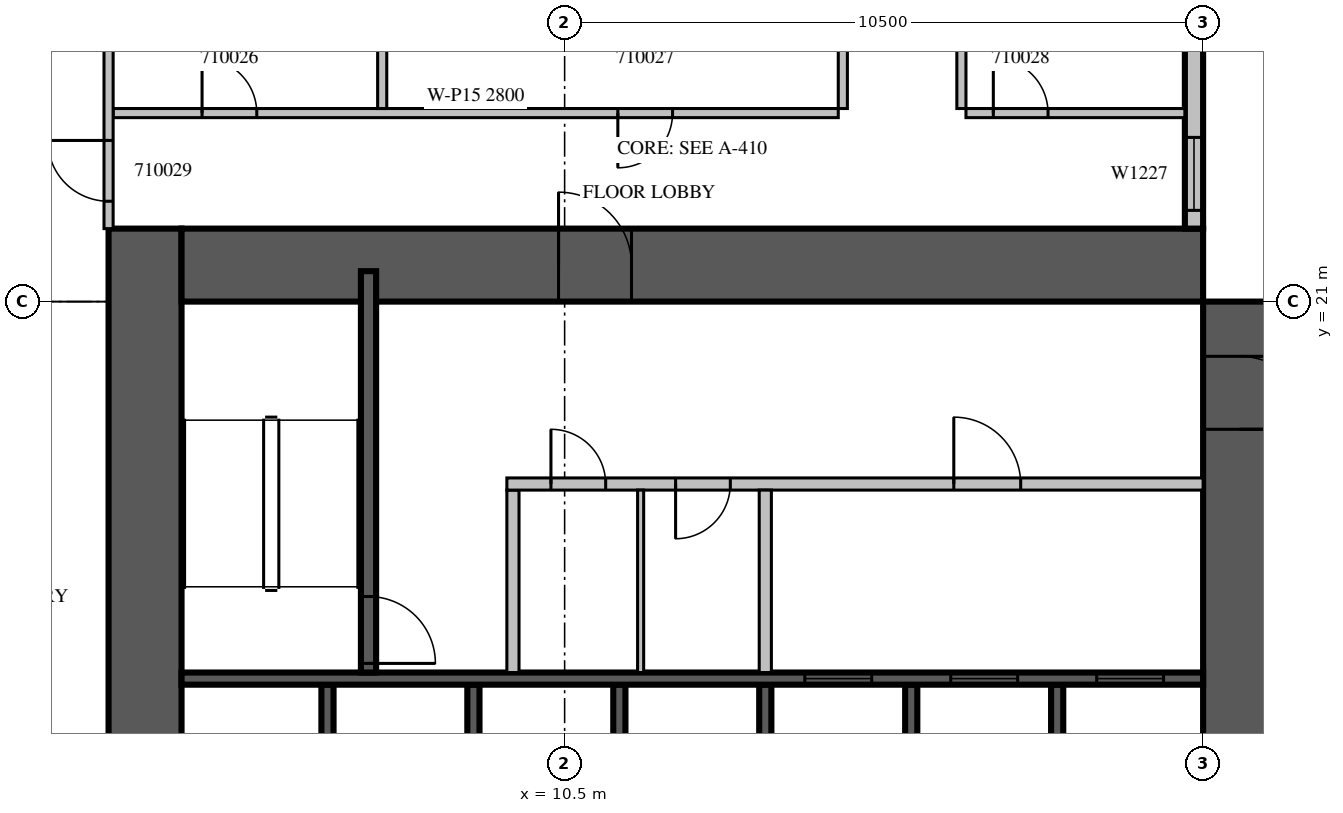
"""IFC4 building model, lengths in metres.
Left out: names, types, materials, properties, quantities, classifications, styles, units other than length and angle.
Written with IfcOpenShell. Run it as: python <this file> out.ifc"""

import sys

from ifc_helpers import new_model, si_unit, direction, frame, frame_2d, origin, place, context, subcontext, project, spatial, rectangle, extrude, source, transform, mapped, element, fill, save


model = new_model("IFC4")
c1 = context("Model", 3, precision=1e-05, world=origin(), true_north=direction((0.0, 1.0)))
c2 = subcontext(c1, "Body", "Model", "MODEL_VIEW")
j1 = project(units=[si_unit("LENGTHUNIT", "METRE"), si_unit("PLANEANGLEUNIT", "RADIAN")], contexts=[c1])
p1 = place(None, origin())
s1 = spatial("IfcSite", under=j1, at=p1, CompositionType="ELEMENT")
p2 = place(p1, origin())
s2 = spatial("IfcBuilding", under=s1, at=p2, CompositionType="ELEMENT")
p3 = place(p2, frame((0.0, 0.0, 53.1)))
s3 = spatial("IfcBuildingStorey", under=s2, at=p3, CompositionType="ELEMENT", Elevation=53.1)
m1 = source(origin(), c2, "Body", "SweptSolid", [
    extrude(rectangle(XDim=18.0, YDim=1.2, at=frame_2d((9.0, 0.0))), origin(), (0.0, 0.0, 1.0), 4.2),
])
p4 = place(p3, frame((3.6, 4.2, 0.0), z_axis=(0.0, 0.0, 1.0), x_axis=(0.0, 1.0, 0.0)))
e1 = element("IfcWall", 1, at=p4, inside=s3, PredefinedType="SHEAR", context=c2, shape_type="MappedRepresentation", body=[
    mapped(m1, transform((0.0, 0.0, 0.0), scale=1.0)),
])
m2 = source(origin(), c2, "Body", "SweptSolid", [
    extrude(rectangle(XDim=2.2, YDim=2.1, at=frame_2d((1.1, 1.05))), frame((0.0, 0.61, 0.0), z_axis=(0.0, -1.0, 0.0), x_axis=(1.0, 0.0, 0.0)), (0.0, 0.0, 1.0), 1.22),
])
p5 = place(p4, frame((4.2, 0.0, 0.0)))
e2 = element("IfcOpeningElement", 2, at=p5, cuts=e1, PredefinedType="OPENING", context=c2, shape_type="MappedRepresentation", body=[
    mapped(m2, transform((0.0, 0.0, 0.0), scale=1.0)),
])
m3 = source(origin(), c2, "Body", "SweptSolid", [
    extrude(rectangle(XDim=16.8, YDim=1.2, at=frame_2d((8.4, 0.0))), origin(), (0.0, 0.0, 1.0), 4.2),
])
p6 = place(p3, frame((21.6, 4.2, 0.0), z_axis=(0.0, 0.0, 1.0), x_axis=(0.0, 1.0, 0.0)))
e3 = element("IfcWall", 3, at=p6, inside=s3, PredefinedType="SHEAR", context=c2, shape_type="MappedRepresentation", body=[
    mapped(m3, transform((0.0, 0.0, 0.0), scale=1.0)),
])
m4 = source(origin(), c2, "Body", "SweptSolid", [
    extrude(rectangle(XDim=1.2, YDim=2.1, at=frame_2d((0.6, 1.05))), frame((0.0, 0.61, 0.0), z_axis=(0.0, -1.0, 0.0), x_axis=(1.0, 0.0, 0.0)), (0.0, 0.0, 1.0), 1.22),
])
p7 = place(p6, frame((14.7, 0.0, 0.0)))
e4 = element("IfcOpeningElement", 4, at=p7, cuts=e3, PredefinedType="OPENING", context=c2, shape_type="MappedRepresentation", body=[
    mapped(m4, transform((0.0, 0.0, 0.0), scale=1.0)),
])
p8 = place(p3, frame((4.2, 21.6, 0.0), z_axis=(0.0, 0.0, 1.0), x_axis=(1.0, 0.0, 0.0)))
e5 = element("IfcWall", 5, at=p8, inside=s3, PredefinedType="SHEAR", context=c2, shape_type="MappedRepresentation", body=[
    mapped(m3, transform((0.0, 0.0, 0.0), scale=1.0)),
])
p9 = place(p8, frame((6.2, 0.0, 0.0)))
e6 = element("IfcOpeningElement", 6, at=p9, cuts=e5, PredefinedType="OPENING", context=c2, shape_type="MappedRepresentation", body=[
    mapped(m4, transform((0.0, 0.0, 0.0), scale=1.0)),
])
m5 = source(origin(), c2, "Body", "SweptSolid", [
    extrude(rectangle(XDim=6.6, YDim=0.3, at=frame_2d((3.3, 0.0))), origin(), (0.0, 0.0, 1.0), 3.8),
])
p10 = place(p3, frame((20.85, 22.2, 0.0), z_axis=(0.0, 0.0, 1.0), x_axis=(0.0, 1.0, 0.0)))
e7 = element("IfcWall", 7, at=p10, inside=s3, PredefinedType="STANDARD", context=c2, shape_type="MappedRepresentation", body=[
    mapped(m5, transform((0.0, 0.0, 0.0), scale=1.0)),
])
m6 = source(origin(), c2, "Body", "SweptSolid", [
    extrude(rectangle(XDim=1.2, YDim=2.7, at=frame_2d((0.6, 1.35))), frame((0.0, 0.16, 0.0), z_axis=(0.0, -1.0, 0.0), x_axis=(1.0, 0.0, 0.0)), (0.0, 0.0, 1.0), 0.32),
])
p11 = place(p10, frame((0.3, 0.0, 0.6)))
e8 = element("IfcOpeningElement", 8, at=p11, cuts=e7, PredefinedType="OPENING", context=c2, shape_type="MappedRepresentation", body=[
    mapped(m6, transform((0.0, 0.0, 0.0), scale=1.0)),
])
m7 = source(origin(), c2, "Body", "SweptSolid", [
    extrude(rectangle(XDim=2.4, YDim=2.7, at=frame_2d((1.2, 1.35))), frame((0.0, 0.16, 0.0), z_axis=(0.0, -1.0, 0.0), x_axis=(1.0, 0.0, 0.0)), (0.0, 0.0, 1.0), 0.32),
])
p12 = place(p10, frame((3.9, 0.0, 0.6)))
e9 = element("IfcOpeningElement", 9, at=p12, cuts=e7, PredefinedType="OPENING", context=c2, shape_type="MappedRepresentation", body=[
    mapped(m7, transform((0.0, 0.0, 0.0), scale=1.0)),
])
m8 = source(origin(), c2, "Body", "SweptSolid", [
    extrude(rectangle(XDim=3.0, YDim=0.2, at=frame_2d((1.5, 0.0))), origin(), (0.0, 0.0, 1.0), 4.2),
])
for number, where, z_axis, x_axis in (
    (10, (6.6, 11.7, 0.0), (0.0, 0.0, 1.0), (0.0, 1.0, 0.0)),
    (11, (9.0, 11.7, 0.0), (0.0, 0.0, 1.0), (0.0, 1.0, 0.0)),
    (12, (11.4, 11.7, 0.0), (0.0, 0.0, 1.0), (0.0, 1.0, 0.0)),
    (13, (13.8, 11.7, 0.0), (0.0, 0.0, 1.0), (0.0, 1.0, 0.0)),
    (14, (16.2, 11.7, 0.0), (0.0, 0.0, 1.0), (0.0, 1.0, 0.0)),
    (15, (18.6, 11.7, 0.0), (0.0, 0.0, 1.0), (0.0, 1.0, 0.0)),
):
    element("IfcWall", number, at=place(p3, frame(where, z_axis=z_axis, x_axis=x_axis)), inside=s3, PredefinedType="SOLIDWALL", context=c2, shape_type="MappedRepresentation", body=[
        mapped(m8, transform((0.0, 0.0, 0.0), scale=1.0)),
    ])
m9 = source(origin(), c2, "Body", "SweptSolid", [
    extrude(rectangle(XDim=16.8, YDim=0.2, at=frame_2d((8.4, 0.0))), origin(), (0.0, 0.0, 1.0), 4.2),
])
p13 = place(p3, frame((4.2, 14.8, 0.0), z_axis=(0.0, 0.0, 1.0), x_axis=(1.0, 0.0, 0.0)))
e16 = element("IfcWall", 16, at=p13, inside=s3, PredefinedType="SOLIDWALL", context=c2, shape_type="MappedRepresentation", body=[
    mapped(m9, transform((0.0, 0.0, 0.0), scale=1.0)),
])
m10 = source(origin(), c2, "Body", "SweptSolid", [
    extrude(rectangle(XDim=1.1, YDim=2.1, at=frame_2d((0.55, 1.05))), frame((0.0, 0.11, 0.0), z_axis=(0.0, -1.0, 0.0), x_axis=(1.0, 0.0, 0.0)), (0.0, 0.0, 1.0), 0.22),
])
p14 = place(p13, frame((10.25, 0.0, 0.0)))
e17 = element("IfcOpeningElement", 17, at=p14, cuts=e16, PredefinedType="OPENING", context=c2, shape_type="MappedRepresentation", body=[
    mapped(m10, transform((0.0, 0.0, 0.0), scale=1.0)),
])
p15 = place(p13, frame((12.65, 0.0, 0.0)))
e18 = element("IfcOpeningElement", 18, at=p15, cuts=e16, PredefinedType="OPENING", context=c2, shape_type="MappedRepresentation", body=[
    mapped(m10, transform((0.0, 0.0, 0.0), scale=1.0)),
])
p16 = place(p13, frame((15.05, 0.0, 0.0)))
e19 = element("IfcOpeningElement", 19, at=p16, cuts=e16, PredefinedType="OPENING", context=c2, shape_type="MappedRepresentation", body=[
    mapped(m10, transform((0.0, 0.0, 0.0), scale=1.0)),
])
m11 = source(origin(), c2, "Body", "SweptSolid", [
    extrude(rectangle(XDim=6.6, YDim=0.25, at=frame_2d((3.3, 0.0))), origin(), (0.0, 0.0, 1.0), 3.8),
])
p17 = place(p3, frame((7.275, 14.9, 0.0), z_axis=(0.0, 0.0, 1.0), x_axis=(0.0, 1.0, 0.0)))
e20 = element("IfcWall", 20, at=p17, inside=s3, PredefinedType="SOLIDWALL", context=c2, shape_type="MappedRepresentation", body=[
    mapped(m11, transform((0.0, 0.0, 0.0), scale=1.0)),
])
m12 = source(origin(), c2, "Body", "SweptSolid", [
    extrude(rectangle(XDim=1.1, YDim=2.1, at=frame_2d((0.55, 1.05))), frame((0.0, 0.135, 0.0), z_axis=(0.0, -1.0, 0.0), x_axis=(1.0, 0.0, 0.0)), (0.0, 0.0, 1.0), 0.27),
])
p18 = place(p17, frame((0.15, 0.0, 0.0)))
e21 = element("IfcOpeningElement", 21, at=p18, cuts=e20, PredefinedType="OPENING", context=c2, shape_type="MappedRepresentation", body=[
    mapped(m12, transform((0.0, 0.0, 0.0), scale=1.0)),
])
m13 = source(origin(), c2, "Body", "SweptSolid", [
    extrude(rectangle(XDim=3.0, YDim=0.2, at=frame_2d((1.5, 0.0))), origin(), (0.0, 0.0, 1.0), 3.8),
])
p19 = place(p3, frame((9.65, 14.9, 0.0), z_axis=(0.0, 0.0, 1.0), x_axis=(0.0, 1.0, 0.0)))
e22 = element("IfcWall", 22, at=p19, inside=s3, PredefinedType="PARTITIONING", context=c2, shape_type="MappedRepresentation", body=[
    mapped(m13, transform((0.0, 0.0, 0.0), scale=1.0)),
])
m14 = source(origin(), c2, "Body", "SweptSolid", [
    extrude(rectangle(XDim=11.45, YDim=0.2, at=frame_2d((5.725, 0.0))), origin(), (0.0, 0.0, 1.0), 3.8),
])
p20 = place(p3, frame((9.55, 18.0, 0.0), z_axis=(0.0, 0.0, 1.0), x_axis=(1.0, 0.0, 0.0)))
e23 = element("IfcWall", 23, at=p20, inside=s3, PredefinedType="PARTITIONING", context=c2, shape_type="MappedRepresentation", body=[
    mapped(m14, transform((0.0, 0.0, 0.0), scale=1.0)),
])
m15 = source(origin(), c2, "Body", "SweptSolid", [
    extrude(rectangle(XDim=0.9, YDim=2.1, at=frame_2d((0.45, 1.05))), frame((0.0, 0.11, 0.0), z_axis=(0.0, -1.0, 0.0), x_axis=(1.0, 0.0, 0.0)), (0.0, 0.0, 1.0), 0.22),
])
p21 = place(p20, frame((0.725, 0.0, 0.0)))
e24 = element("IfcOpeningElement", 24, at=p21, cuts=e23, PredefinedType="OPENING", context=c2, shape_type="MappedRepresentation", body=[
    mapped(m15, transform((0.0, 0.0, 0.0), scale=1.0)),
])
p22 = place(p20, frame((2.775, 0.0, 0.0)))
e25 = element("IfcOpeningElement", 25, at=p22, cuts=e23, PredefinedType="OPENING", context=c2, shape_type="MappedRepresentation", body=[
    mapped(m15, transform((0.0, 0.0, 0.0), scale=1.0)),
])
p23 = place(p20, frame((7.35, 0.0, 0.0)))
e26 = element("IfcOpeningElement", 26, at=p23, cuts=e23, PredefinedType="OPENING", context=c2, shape_type="MappedRepresentation", body=[
    mapped(m10, transform((0.0, 0.0, 0.0), scale=1.0)),
])
p24 = place(p3, frame((13.8, 14.9, 0.0), z_axis=(0.0, 0.0, 1.0), x_axis=(0.0, 1.0, 0.0)))
e27 = element("IfcWall", 27, at=p24, inside=s3, PredefinedType="PARTITIONING", context=c2, shape_type="MappedRepresentation", body=[
    mapped(m13, transform((0.0, 0.0, 0.0), scale=1.0)),
])
m16 = source(origin(), c2, "Body", "SweptSolid", [
    extrude(rectangle(XDim=3.0, YDim=0.1, at=frame_2d((1.5, 0.0))), origin(), (0.0, 0.0, 1.0), 3.8),
])
p25 = place(p3, frame((11.75, 14.9, 0.0), z_axis=(0.0, 0.0, 1.0), x_axis=(0.0, 1.0, 0.0)))
e28 = element("IfcWall", 28, at=p25, inside=s3, PredefinedType="PARTITIONING", context=c2, shape_type="MappedRepresentation", body=[
    mapped(m16, transform((0.0, 0.0, 0.0), scale=1.0)),
])
m17 = source(origin(), c2, "Body", "SweptSolid", [
    extrude(rectangle(XDim=11.925, YDim=0.15, at=frame_2d((5.963, 0.0))), origin(), (0.0, 0.0, 1.0), 2.8),
])
p26 = place(p3, frame((3.075, 24.1, 0.0), z_axis=(0.0, 0.0, 1.0), x_axis=(1.0, 0.0, 0.0)))
e29 = element("IfcWall", 29, at=p26, inside=s3, PredefinedType="PARTITIONING", context=c2, shape_type="MappedRepresentation", body=[
    mapped(m17, transform((0.0, 0.0, 0.0), scale=1.0)),
])
m18 = source(origin(), c2, "Body", "SweptSolid", [
    extrude(rectangle(XDim=0.9, YDim=2.1, at=frame_2d((0.45, 1.05))), frame((0.0, 0.085, 0.0), z_axis=(0.0, -1.0, 0.0), x_axis=(1.0, 0.0, 0.0)), (0.0, 0.0, 1.0), 0.17),
])
p27 = place(p26, frame((1.462, 0.0, 0.0)))
e30 = element("IfcOpeningElement", 30, at=p27, cuts=e29, PredefinedType="OPENING", context=c2, shape_type="MappedRepresentation", body=[
    mapped(m18, transform((0.0, 0.0, 0.0), scale=1.0)),
])
p28 = place(p26, frame((8.3, 0.0, 0.0)))
e31 = element("IfcOpeningElement", 31, at=p28, cuts=e29, PredefinedType="OPENING", context=c2, shape_type="MappedRepresentation", body=[
    mapped(m18, transform((0.0, 0.0, 0.0), scale=1.0)),
])
m19 = source(origin(), c2, "Body", "SweptSolid", [
    extrude(rectangle(XDim=3.6, YDim=0.15, at=frame_2d((1.8, 0.0))), origin(), (0.0, 0.0, 1.0), 3.8),
])
p29 = place(p3, frame((17.1, 24.1, 0.0), z_axis=(0.0, 0.0, 1.0), x_axis=(1.0, 0.0, 0.0)))
e32 = element("IfcWall", 32, at=p29, inside=s3, PredefinedType="PARTITIONING", context=c2, shape_type="MappedRepresentation", body=[
    mapped(m19, transform((0.0, 0.0, 0.0), scale=1.0)),
])
p30 = place(p29, frame((0.45, 0.0, 0.0)))
e33 = element("IfcOpeningElement", 33, at=p30, cuts=e32, PredefinedType="OPENING", context=c2, shape_type="MappedRepresentation", body=[
    mapped(m18, transform((0.0, 0.0, 0.0), scale=1.0)),
])
m20 = source(origin(), c2, "Body", "SweptSolid", [
    extrude(rectangle(XDim=5.15, YDim=0.15, at=frame_2d((2.575, 0.0))), origin(), (0.0, 0.0, 1.0), 3.3),
])
p31 = place(p3, frame((7.5, 24.175, 0.0), z_axis=(0.0, 0.0, 1.0), x_axis=(0.0, 1.0, 0.0)))
e34 = element("IfcWall", 34, at=p31, inside=s3, PredefinedType="PARTITIONING", context=c2, shape_type="MappedRepresentation", body=[
    mapped(m20, transform((0.0, 0.0, 0.0), scale=1.0)),
])
m21 = source(origin(), c2, "Body", "SweptSolid", [
    extrude(rectangle(XDim=5.15, YDim=0.15, at=frame_2d((2.575, 0.0))), origin(), (0.0, 0.0, 1.0), 3.8),
])
for number, where, z_axis, x_axis in (
    (35, (15.075, 24.175, 0.0), (0.0, 0.0, 1.0), (0.0, 1.0, 0.0)),
    (36, (17.025, 29.325, 0.0), (0.0, 0.0, 1.0), (0.0, -1.0, 0.0)),
):
    element("IfcWall", number, at=place(p3, frame(where, z_axis=z_axis, x_axis=x_axis)), inside=s3, PredefinedType="PARTITIONING", context=c2, shape_type="MappedRepresentation", body=[
        mapped(m21, transform((0.0, 0.0, 0.0), scale=1.0)),
    ])
m22 = source(origin(), c2, "Body", "SweptSolid", [
    extrude(rectangle(XDim=7.125, YDim=0.15, at=frame_2d((3.562, 0.0))), origin(), (0.0, 0.0, 1.0), 3.3),
])
p32 = place(p3, frame((3.0, 29.325, 0.0), z_axis=(0.0, 0.0, 1.0), x_axis=(0.0, -1.0, 0.0)))
e37 = element("IfcWall", 37, at=p32, inside=s3, PredefinedType="PARTITIONING", context=c2, shape_type="MappedRepresentation", body=[
    mapped(m22, transform((0.0, 0.0, 0.0), scale=1.0)),
])
m23 = source(origin(), c2, "Body", "SweptSolid", [
    extrude(rectangle(XDim=1.0, YDim=2.1, at=frame_2d((0.5, 1.05))), frame((0.0, 0.085, 0.0), z_axis=(0.0, -1.0, 0.0), x_axis=(1.0, 0.0, 0.0)), (0.0, 0.0, 1.0), 0.17),
])
p33 = place(p32, frame((5.675, 0.0, 0.0)))
e38 = element("IfcOpeningElement", 38, at=p33, cuts=e37, PredefinedType="OPENING", context=c2, shape_type="MappedRepresentation", body=[
    mapped(m23, transform((0.0, 0.0, 0.0), scale=1.0)),
])
m24 = source(origin(), c2, "Body", "SweptSolid", [
    extrude(rectangle(XDim=1.2, YDim=2.7, at=frame_2d((0.6, 1.35))), frame((0.0, 0.03, 0.0), z_axis=(0.0, -1.0, 0.0), x_axis=(1.0, 0.0, 0.0)), (0.0, 0.0, 1.0), 0.06),
])
p34 = place(p11, origin())
e39 = element("IfcWindow", 39, at=p34, inside=s3, PartitioningType="SINGLE_PANEL", PredefinedType="WINDOW", context=c2, shape_type="MappedRepresentation", body=[
    mapped(m24, transform((0.0, 0.0, 0.0), scale=1.0)),
])
fill(e8, e39)
m25 = source(origin(), c2, "Body", "SweptSolid", [
    extrude(rectangle(XDim=1.1, YDim=2.1, at=frame_2d((0.55, 1.05))), frame((0.0, 0.025, 0.0), z_axis=(0.0, -1.0, 0.0), x_axis=(1.0, 0.0, 0.0)), (0.0, 0.0, 1.0), 0.05),
])
p35 = place(p14, origin())
e40 = element("IfcDoor", 40, at=p35, inside=s3, OperationType="SLIDING_TO_LEFT", PredefinedType="DOOR", context=c2, shape_type="MappedRepresentation", body=[
    mapped(m25, transform((0.0, 0.0, 0.0), scale=1.0)),
])
fill(e17, e40)
p36 = place(p15, origin())
e41 = element("IfcDoor", 41, at=p36, inside=s3, OperationType="SLIDING_TO_LEFT", PredefinedType="DOOR", context=c2, shape_type="MappedRepresentation", body=[
    mapped(m25, transform((0.0, 0.0, 0.0), scale=1.0)),
])
fill(e18, e41)
p37 = place(p16, origin())
e42 = element("IfcDoor", 42, at=p37, inside=s3, OperationType="SLIDING_TO_LEFT", PredefinedType="DOOR", context=c2, shape_type="MappedRepresentation", body=[
    mapped(m25, transform((0.0, 0.0, 0.0), scale=1.0)),
])
fill(e19, e42)
p38 = place(p18, origin())
e43 = element("IfcDoor", 43, at=p38, inside=s3, OperationType="SINGLE_SWING_RIGHT", PredefinedType="DOOR", context=c2, shape_type="MappedRepresentation", body=[
    mapped(m25, transform((0.0, 0.0, 0.0), scale=1.0)),
])
fill(e21, e43)
m26 = source(origin(), c2, "Body", "SweptSolid", [
    extrude(rectangle(XDim=0.9, YDim=2.1, at=frame_2d((0.45, 1.05))), frame((0.0, 0.025, 0.0), z_axis=(0.0, -1.0, 0.0), x_axis=(1.0, 0.0, 0.0)), (0.0, 0.0, 1.0), 0.05),
])
p39 = place(p21, origin())
e44 = element("IfcDoor", 44, at=p39, inside=s3, OperationType="SINGLE_SWING_LEFT", PredefinedType="DOOR", context=c2, shape_type="MappedRepresentation", body=[
    mapped(m26, transform((0.0, 0.0, 0.0), scale=1.0)),
])
fill(e24, e44)
p40 = place(p22, origin())
e45 = element("IfcDoor", 45, at=p40, inside=s3, OperationType="SINGLE_SWING_RIGHT", PredefinedType="DOOR", context=c2, shape_type="MappedRepresentation", body=[
    mapped(m26, transform((0.0, 0.0, 0.0), scale=1.0)),
])
fill(e25, e45)
p41 = place(p23, origin())
e46 = element("IfcDoor", 46, at=p41, inside=s3, OperationType="SINGLE_SWING_LEFT", PredefinedType="DOOR", context=c2, shape_type="MappedRepresentation", body=[
    mapped(m25, transform((0.0, 0.0, 0.0), scale=1.0)),
])
fill(e26, e46)
m27 = source(origin(), c2, "Body", "SweptSolid", [
    extrude(rectangle(XDim=1.2, YDim=2.1, at=frame_2d((0.6, 1.05))), frame((0.0, 0.025, 0.0), z_axis=(0.0, -1.0, 0.0), x_axis=(1.0, 0.0, 0.0)), (0.0, 0.0, 1.0), 0.05),
])
p42 = place(p9, origin())
e47 = element("IfcDoor", 47, at=p42, inside=s3, OperationType="SINGLE_SWING_LEFT", PredefinedType="DOOR", context=c2, shape_type="MappedRepresentation", body=[
    mapped(m27, transform((0.0, 0.0, 0.0), scale=1.0)),
])
fill(e6, e47)
p43 = place(p7, origin())
e48 = element("IfcDoor", 48, at=p43, inside=s3, OperationType="SINGLE_SWING_RIGHT", PredefinedType="DOOR", context=c2, shape_type="MappedRepresentation", body=[
    mapped(m27, transform((0.0, 0.0, 0.0), scale=1.0)),
])
fill(e4, e48)
p44 = place(p27, origin())
e49 = element("IfcDoor", 49, at=p44, inside=s3, OperationType="SINGLE_SWING_LEFT", PredefinedType="DOOR", context=c2, shape_type="MappedRepresentation", body=[
    mapped(m26, transform((0.0, 0.0, 0.0), scale=1.0)),
])
fill(e30, e49)
p45 = place(p28, origin())
e50 = element("IfcDoor", 50, at=p45, inside=s3, OperationType="SINGLE_SWING_RIGHT", PredefinedType="DOOR", context=c2, shape_type="MappedRepresentation", body=[
    mapped(m26, transform((0.0, 0.0, 0.0), scale=1.0)),
])
fill(e31, e50)
p46 = place(p30, origin())
e51 = element("IfcDoor", 51, at=p46, inside=s3, OperationType="SINGLE_SWING_LEFT", PredefinedType="DOOR", context=c2, shape_type="MappedRepresentation", body=[
    mapped(m26, transform((0.0, 0.0, 0.0), scale=1.0)),
])
fill(e33, e51)
m28 = source(origin(), c2, "Body", "SweptSolid", [
    extrude(rectangle(XDim=1.0, YDim=2.1, at=frame_2d((0.5, 1.05))), frame((0.0, 0.025, 0.0), z_axis=(0.0, -1.0, 0.0), x_axis=(1.0, 0.0, 0.0)), (0.0, 0.0, 1.0), 0.05),
])
p47 = place(p33, origin())
e52 = element("IfcDoor", 52, at=p47, inside=s3, OperationType="SINGLE_SWING_RIGHT", PredefinedType="DOOR", context=c2, shape_type="MappedRepresentation", body=[
    mapped(m28, transform((0.0, 0.0, 0.0), scale=1.0)),
])
fill(e38, e52)
save(model, sys.argv[1])
